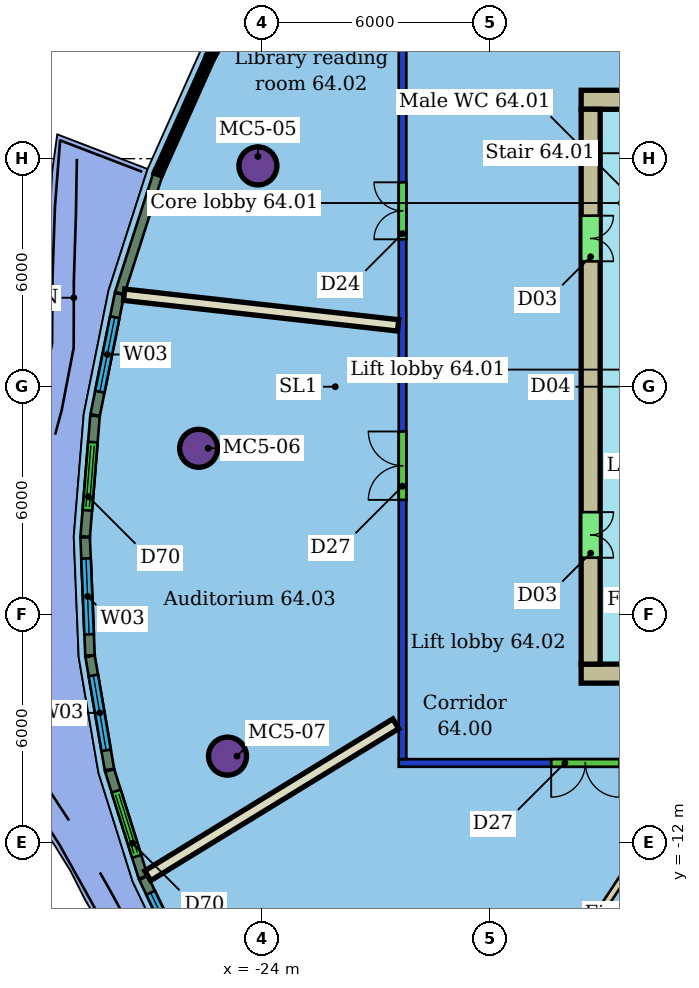
"""IFC4 building model, lengths in metres.
Left out: names, types, materials, properties, quantities, classifications, styles, units other than length and angle.
Written with IfcOpenShell. Run it as: python <this file> out.ifc"""

import sys

from ifc_helpers import new_model, si_unit, direction, frame, frame_2d, origin, origin_2d, place, context, subcontext, project, spatial, rectangle, hollow_circle, extrude, element, fill, save


model = new_model("IFC4")
c1 = context("Model", 3, precision=1e-05, world=origin(), true_north=direction((0.0, 1.0)))
c2 = subcontext(c1, "Body", "Model", "MODEL_VIEW")
j1 = project(units=[si_unit("LENGTHUNIT", "METRE"), si_unit("PLANEANGLEUNIT", "RADIAN")], contexts=[c1])
p1 = place(None, origin())
s1 = spatial("IfcSite", under=j1, at=p1, CompositionType="ELEMENT")
p2 = place(p1, origin())
s2 = spatial("IfcBuilding", under=s1, at=p2, CompositionType="ELEMENT")
p3 = place(p2, frame((0.0, 0.0, 261.3)))
s3 = spatial("IfcBuildingStorey", under=s2, at=p3, CompositionType="ELEMENT", Elevation=261.3)
for number, where, z_axis, x_axis in (
    (1, (-24.106, 5.81, 0.0), (0.0, 0.0, 1.0), (1.0, 0.0, 0.0)),
    (2, (-25.666, -1.62, 0.0), (0.0, 0.0, 1.0), (1.0, 0.0, 0.0)),
    (3, (-24.906, -9.72, 0.0), (0.0, 0.0, 1.0), (1.0, 0.0, 0.0)),
):
    element("IfcColumn", number, at=place(p3, frame(where, z_axis=z_axis, x_axis=x_axis)), inside=s3, PredefinedType="COLUMN", context=c2, shape_type="SweptSolid", body=[
        extrude(hollow_circle(Radius=0.5, WallThickness=0.04, at=origin_2d()), origin(), (0.0, 0.0, 1.0), 3.45),
    ])
p4 = place(p3, frame((8.4, -9.9, 0.0), z_axis=(0.0, 0.0, 1.0), x_axis=(-1.0, 0.0, 0.0)))
e4 = element("IfcWall", 4, at=p4, inside=s3, PredefinedType="PARTITIONING", context=c2, shape_type="SweptSolid", body=[
    extrude(rectangle(XDim=28.8, YDim=0.2, at=frame_2d((14.4, 0.0))), origin(), (0.0, 0.0, 1.0), 3.1),
])
p5 = place(p4, frame((22.989, 0.0, 0.0)))
e5 = element("IfcOpeningElement", 5, at=p5, cuts=e4, PredefinedType="OPENING", context=c2, shape_type="SweptSolid", body=[
    extrude(rectangle(XDim=1.8, YDim=2.4, at=frame_2d((0.9, 1.2))), frame((0.0, 0.11, 0.0), z_axis=(0.0, -1.0, 0.0), x_axis=(1.0, 0.0, 0.0)), (0.0, 0.0, 1.0), 0.22),
])
p6 = place(p4, frame((17.073, 0.0, 0.0)))
e6 = element("IfcOpeningElement", 6, at=p6, cuts=e4, PredefinedType="OPENING", context=c2, shape_type="SweptSolid", body=[
    extrude(rectangle(XDim=1.5, YDim=2.4, at=frame_2d((0.75, 1.2))), frame((0.0, 0.11, 0.0), z_axis=(0.0, -1.0, 0.0), x_axis=(1.0, 0.0, 0.0)), (0.0, 0.0, 1.0), 0.22),
])
p7 = place(p4, frame((8.043, 0.0, 0.0)))
e7 = element("IfcOpeningElement", 7, at=p7, cuts=e4, PredefinedType="OPENING", context=c2, shape_type="SweptSolid", body=[
    extrude(rectangle(XDim=0.9, YDim=2.1, at=frame_2d((0.45, 1.05))), frame((0.0, 0.11, 0.0), z_axis=(0.0, -1.0, 0.0), x_axis=(1.0, 0.0, 0.0)), (0.0, 0.0, 1.0), 0.22),
])
p8 = place(p4, frame((3.308, 0.0, 0.0)))
e8 = element("IfcOpeningElement", 8, at=p8, cuts=e4, PredefinedType="OPENING", context=c2, shape_type="SweptSolid", body=[
    extrude(rectangle(XDim=1.5, YDim=2.1, at=frame_2d((0.75, 1.05))), frame((0.0, 0.11, 0.0), z_axis=(0.0, -1.0, 0.0), x_axis=(1.0, 0.0, 0.0)), (0.0, 0.0, 1.0), 0.22),
])
p9 = place(p3, frame((-20.3, -9.8, 0.0), z_axis=(0.0, 0.0, 1.0), x_axis=(0.0, 1.0, 0.0)))
e9 = element("IfcWall", 9, at=p9, inside=s3, PredefinedType="PARTITIONING", context=c2, shape_type="SweptSolid", body=[
    extrude(rectangle(XDim=19.6, YDim=0.2, at=frame_2d((9.8, 0.0))), origin(), (0.0, 0.0, 1.0), 3.1),
])
p10 = place(p9, frame((13.678, 0.0, 0.0)))
e10 = element("IfcOpeningElement", 10, at=p10, cuts=e9, PredefinedType="OPENING", context=c2, shape_type="SweptSolid", body=[
    extrude(rectangle(XDim=1.5, YDim=2.1, at=frame_2d((0.75, 1.05))), frame((0.0, 0.11, 0.0), z_axis=(0.0, -1.0, 0.0), x_axis=(1.0, 0.0, 0.0)), (0.0, 0.0, 1.0), 0.22),
])
p11 = place(p9, frame((6.822, 0.0, 0.0)))
e11 = element("IfcOpeningElement", 11, at=p11, cuts=e9, PredefinedType="OPENING", context=c2, shape_type="SweptSolid", body=[
    extrude(rectangle(XDim=1.8, YDim=2.4, at=frame_2d((0.9, 1.2))), frame((0.0, 0.11, 0.0), z_axis=(0.0, -1.0, 0.0), x_axis=(1.0, 0.0, 0.0)), (0.0, 0.0, 1.0), 0.22),
])
p12 = place(p3, frame((-27.626, 2.421, 0.0), z_axis=(0.0, 0.0, 1.0), x_axis=(0.993791041834, -0.11126259556, 0.0)))
e12 = element("IfcWall", 12, at=p12, inside=s3, PredefinedType="PARTITIONING", context=c2, shape_type="SweptSolid", body=[
    extrude(rectangle(XDim=7.254, YDim=0.3, at=frame_2d((3.627, 0.0))), origin(), (0.0, 0.0, 1.0), 3.45),
])
p13 = place(p3, frame((-27.006, -12.867, 0.0), z_axis=(0.0, 0.0, 1.0), x_axis=(0.852737367146, 0.522339911047, 0.0)))
e13 = element("IfcWall", 13, at=p13, inside=s3, PredefinedType="PARTITIONING", context=c2, shape_type="SweptSolid", body=[
    extrude(rectangle(XDim=7.655, YDim=0.3, at=frame_2d((3.827, 0.0))), origin(), (0.0, 0.0, 1.0), 3.45),
])
p14 = place(p3, frame((-20.146, -21.485, 0.0), z_axis=(0.0, 0.0, 1.0), x_axis=(0.549897752102, 0.835231981089, 0.0)))
e14 = element("IfcWall", 14, at=p14, inside=s3, PredefinedType="PARTITIONING", context=c2, shape_type="SweptSolid", body=[
    extrude(rectangle(XDim=13.694, YDim=0.175, at=frame_2d((6.847, 0.0))), origin(), (0.0, 0.0, 1.0), 3.45),
])
p15 = place(p3, frame((-26.745, 5.569, 0.0), z_axis=(0.0, 0.0, 1.0), x_axis=(-0.305926817151, -0.95205503126, 0.0)))
e15 = element("IfcWall", 15, at=p15, inside=s3, PredefinedType="SOLIDWALL", context=c2, shape_type="SweptSolid", body=[
    extrude(rectangle(XDim=3.262, YDim=0.25, at=frame_2d((1.631, 0.0))), origin(), (0.0, 0.0, 1.0), 3.15),
])
p16 = place(p3, frame((-27.749, 2.442, 0.0), z_axis=(0.0, 0.0, 1.0), x_axis=(-0.196910086412, -0.980421551104, 0.0)))
e16 = element("IfcWall", 16, at=p16, inside=s3, PredefinedType="SOLIDWALL", context=c2, shape_type="SweptSolid", body=[
    extrude(rectangle(XDim=3.252, YDim=0.25, at=frame_2d((1.626, 0.0))), origin(), (0.0, 0.0, 1.0), 3.15),
])
p17 = place(p16, frame((0.626, 0.0, 0.9)))
e17 = element("IfcOpeningElement", 17, at=p17, cuts=e16, PredefinedType="OPENING", context=c2, shape_type="SweptSolid", body=[
    extrude(rectangle(XDim=2.0, YDim=2.1, at=frame_2d((1.0, 1.05))), frame((0.0, 0.135, 0.0), z_axis=(0.0, -1.0, 0.0), x_axis=(1.0, 0.0, 0.0)), (0.0, 0.0, 1.0), 0.27),
])
p18 = place(p3, frame((-28.393, -0.769, 0.0), z_axis=(0.0, 0.0, 1.0), x_axis=(-0.081211205115, -0.996696914896, 0.0)))
e18 = element("IfcWall", 18, at=p18, inside=s3, PredefinedType="SOLIDWALL", context=c2, shape_type="SweptSolid", body=[
    extrude(rectangle(XDim=3.184, YDim=0.25, at=frame_2d((1.592, 0.0))), origin(), (0.0, 0.0, 1.0), 3.15),
])
p19 = place(p18, frame((0.692, 0.0, 0.0)))
e19 = element("IfcOpeningElement", 19, at=p19, cuts=e18, PredefinedType="OPENING", context=c2, shape_type="SweptSolid", body=[
    extrude(rectangle(XDim=1.8, YDim=2.4, at=frame_2d((0.9, 1.2))), frame((0.0, 0.135, 0.0), z_axis=(0.0, -1.0, 0.0), x_axis=(1.0, 0.0, 0.0)), (0.0, 0.0, 1.0), 0.27),
])
p20 = place(p3, frame((-28.652, -3.965, 0.0), z_axis=(0.0, 0.0, 1.0), x_axis=(0.040878469358, -0.999164126029, 0.0)))
e20 = element("IfcWall", 20, at=p20, inside=s3, PredefinedType="SOLIDWALL", context=c2, shape_type="SweptSolid", body=[
    extrude(rectangle(XDim=3.106, YDim=0.25, at=frame_2d((1.553, 0.0))), origin(), (0.0, 0.0, 1.0), 3.15),
])
p21 = place(p20, frame((0.553, 0.0, 0.9)))
e21 = element("IfcOpeningElement", 21, at=p21, cuts=e20, PredefinedType="OPENING", context=c2, shape_type="SweptSolid", body=[
    extrude(rectangle(XDim=2.0, YDim=2.1, at=frame_2d((1.0, 1.05))), frame((0.0, 0.135, 0.0), z_axis=(0.0, -1.0, 0.0), x_axis=(1.0, 0.0, 0.0)), (0.0, 0.0, 1.0), 0.27),
])
p22 = place(p3, frame((-28.522, -7.092, 0.0), z_axis=(0.0, 0.0, 1.0), x_axis=(0.168497464049, -0.985702087149, 0.0)))
e22 = element("IfcWall", 22, at=p22, inside=s3, PredefinedType="SOLIDWALL", context=c2, shape_type="SweptSolid", body=[
    extrude(rectangle(XDim=3.022, YDim=0.25, at=frame_2d((1.511, 0.0))), origin(), (0.0, 0.0, 1.0), 3.15),
])
p23 = place(p22, frame((0.511, 0.0, 0.9)))
e23 = element("IfcOpeningElement", 23, at=p23, cuts=e22, PredefinedType="OPENING", context=c2, shape_type="SweptSolid", body=[
    extrude(rectangle(XDim=2.0, YDim=2.1, at=frame_2d((1.0, 1.05))), frame((0.0, 0.135, 0.0), z_axis=(0.0, -1.0, 0.0), x_axis=(1.0, 0.0, 0.0)), (0.0, 0.0, 1.0), 0.27),
])
p24 = place(p3, frame((-28.007, -10.096, 0.0), z_axis=(0.0, 0.0, 1.0), x_axis=(0.299763978955, -0.954013394519, 0.0)))
e24 = element("IfcWall", 24, at=p24, inside=s3, PredefinedType="SOLIDWALL", context=c2, shape_type="SweptSolid", body=[
    extrude(rectangle(XDim=2.94, YDim=0.25, at=frame_2d((1.47, 0.0))), origin(), (0.0, 0.0, 1.0), 3.15),
])
p25 = place(p24, frame((0.57, 0.0, 0.0)))
e25 = element("IfcOpeningElement", 25, at=p25, cuts=e24, PredefinedType="OPENING", context=c2, shape_type="SweptSolid", body=[
    extrude(rectangle(XDim=1.8, YDim=2.4, at=frame_2d((0.9, 1.2))), frame((0.0, 0.135, 0.0), z_axis=(0.0, -1.0, 0.0), x_axis=(1.0, 0.0, 0.0)), (0.0, 0.0, 1.0), 0.27),
])
p26 = place(p3, frame((-27.116, -12.925, 0.0), z_axis=(0.0, 0.0, 1.0), x_axis=(0.432043625995, -0.901852707063, 0.0)))
e26 = element("IfcWall", 26, at=p26, inside=s3, PredefinedType="SOLIDWALL", context=c2, shape_type="SweptSolid", body=[
    extrude(rectangle(XDim=2.864, YDim=0.25, at=frame_2d((1.432, 0.0))), origin(), (0.0, 0.0, 1.0), 3.15),
])
p27 = place(p26, frame((0.432, 0.0, 0.9)))
e27 = element("IfcOpeningElement", 27, at=p27, cuts=e26, PredefinedType="OPENING", context=c2, shape_type="SweptSolid", body=[
    extrude(rectangle(XDim=2.0, YDim=2.1, at=frame_2d((1.0, 1.05))), frame((0.0, 0.135, 0.0), z_axis=(0.0, -1.0, 0.0), x_axis=(1.0, 0.0, 0.0)), (0.0, 0.0, 1.0), 0.27),
])
p28 = place(p3, frame((-6.0, 7.55, 0.0), z_axis=(0.0, 0.0, 1.0), x_axis=(-1.0, 0.0, 0.0)))
e28 = element("IfcWall", 28, at=p28, inside=s3, PredefinedType="SHEAR", context=c2, shape_type="SweptSolid", body=[
    extrude(rectangle(XDim=9.6, YDim=0.5, at=frame_2d((4.8, 0.0))), origin(), (0.0, 0.0, 1.0), 3.3),
])
p29 = place(p28, frame((5.2, 0.0, 0.0)))
e29 = element("IfcOpeningElement", 29, at=p29, cuts=e28, PredefinedType="OPENING", context=c2, shape_type="SweptSolid", body=[
    extrude(rectangle(XDim=1.2, YDim=2.1, at=frame_2d((0.6, 1.05))), frame((0.0, 0.26, 0.0), z_axis=(0.0, -1.0, 0.0), x_axis=(1.0, 0.0, 0.0)), (0.0, 0.0, 1.0), 0.52),
])
p30 = place(p3, frame((-15.6, -7.55, 0.0), z_axis=(0.0, 0.0, 1.0), x_axis=(1.0, 0.0, 0.0)))
e30 = element("IfcWall", 30, at=p30, inside=s3, PredefinedType="SHEAR", context=c2, shape_type="SweptSolid", body=[
    extrude(rectangle(XDim=19.2, YDim=0.5, at=frame_2d((9.6, 0.0))), origin(), (0.0, 0.0, 1.0), 3.3),
])
p31 = place(p30, frame((3.6, 0.0, 0.0)))
e31 = element("IfcOpeningElement", 31, at=p31, cuts=e30, PredefinedType="OPENING", context=c2, shape_type="SweptSolid", body=[
    extrude(rectangle(XDim=1.2, YDim=2.1, at=frame_2d((0.6, 1.05))), frame((0.0, 0.26, 0.0), z_axis=(0.0, -1.0, 0.0), x_axis=(1.0, 0.0, 0.0)), (0.0, 0.0, 1.0), 0.52),
])
p32 = place(p3, frame((-15.35, 7.3, 0.0), z_axis=(0.0, 0.0, 1.0), x_axis=(0.0, -1.0, 0.0)))
e32 = element("IfcWall", 32, at=p32, inside=s3, PredefinedType="SHEAR", context=c2, shape_type="SweptSolid", body=[
    extrude(rectangle(XDim=14.6, YDim=0.5, at=frame_2d((7.3, 0.0))), origin(), (0.0, 0.0, 1.0), 3.3),
])
p33 = place(p32, frame((10.6, 0.0, 0.0)))
e33 = element("IfcOpeningElement", 33, at=p33, cuts=e32, PredefinedType="OPENING", context=c2, shape_type="SweptSolid", body=[
    extrude(rectangle(XDim=1.2, YDim=2.1, at=frame_2d((0.6, 1.05))), frame((0.0, 0.26, 0.0), z_axis=(0.0, -1.0, 0.0), x_axis=(1.0, 0.0, 0.0)), (0.0, 0.0, 1.0), 0.52),
])
p34 = place(p32, frame((2.8, 0.0, 0.0)))
e34 = element("IfcOpeningElement", 34, at=p34, cuts=e32, PredefinedType="OPENING", context=c2, shape_type="SweptSolid", body=[
    extrude(rectangle(XDim=1.2, YDim=2.1, at=frame_2d((0.6, 1.05))), frame((0.0, 0.26, 0.0), z_axis=(0.0, -1.0, 0.0), x_axis=(1.0, 0.0, 0.0)), (0.0, 0.0, 1.0), 0.52),
])
p35 = place(p10, origin())
e35 = element("IfcDoor", 35, at=p35, inside=s3, OperationType="DOUBLE_DOOR_SINGLE_SWING", PredefinedType="DOOR", context=c2, shape_type="SweptSolid", body=[
    extrude(rectangle(XDim=1.5, YDim=2.1, at=frame_2d((0.75, 1.05))), frame((0.0, 0.025, 0.0), z_axis=(0.0, -1.0, 0.0), x_axis=(1.0, 0.0, 0.0)), (0.0, 0.0, 1.0), 0.05),
])
fill(e10, e35)
p36 = place(p11, origin())
e36 = element("IfcDoor", 36, at=p36, inside=s3, OperationType="DOUBLE_DOOR_SINGLE_SWING", PredefinedType="DOOR", context=c2, shape_type="SweptSolid", body=[
    extrude(rectangle(XDim=1.8, YDim=2.4, at=frame_2d((0.9, 1.2))), frame((0.0, 0.025, 0.0), z_axis=(0.0, -1.0, 0.0), x_axis=(1.0, 0.0, 0.0)), (0.0, 0.0, 1.0), 0.05),
])
fill(e11, e36)
p37 = place(p5, origin())
e37 = element("IfcDoor", 37, at=p37, inside=s3, OperationType="DOUBLE_DOOR_SINGLE_SWING", PredefinedType="DOOR", context=c2, shape_type="SweptSolid", body=[
    extrude(rectangle(XDim=1.8, YDim=2.4, at=frame_2d((0.9, 1.2))), frame((0.0, 0.025, 0.0), z_axis=(0.0, -1.0, 0.0), x_axis=(1.0, 0.0, 0.0)), (0.0, 0.0, 1.0), 0.05),
])
fill(e5, e37)
p38 = place(p17, origin())
e38 = element("IfcWindow", 38, at=p38, inside=s3, PartitioningType="SINGLE_PANEL", PredefinedType="WINDOW", context=c2, shape_type="SweptSolid", body=[
    extrude(rectangle(XDim=2.0, YDim=2.1, at=frame_2d((1.0, 1.05))), frame((0.0, 0.03, 0.0), z_axis=(0.0, -1.0, 0.0), x_axis=(1.0, 0.0, 0.0)), (0.0, 0.0, 1.0), 0.06),
])
fill(e17, e38)
p39 = place(p19, origin())
e39 = element("IfcDoor", 39, at=p39, inside=s3, OperationType="DOUBLE_DOOR_SLIDING", PredefinedType="DOOR", context=c2, shape_type="SweptSolid", body=[
    extrude(rectangle(XDim=1.8, YDim=2.4, at=frame_2d((0.9, 1.2))), frame((0.0, 0.025, 0.0), z_axis=(0.0, -1.0, 0.0), x_axis=(1.0, 0.0, 0.0)), (0.0, 0.0, 1.0), 0.05),
])
fill(e19, e39)
p40 = place(p21, origin())
e40 = element("IfcWindow", 40, at=p40, inside=s3, PartitioningType="SINGLE_PANEL", PredefinedType="WINDOW", context=c2, shape_type="SweptSolid", body=[
    extrude(rectangle(XDim=2.0, YDim=2.1, at=frame_2d((1.0, 1.05))), frame((0.0, 0.03, 0.0), z_axis=(0.0, -1.0, 0.0), x_axis=(1.0, 0.0, 0.0)), (0.0, 0.0, 1.0), 0.06),
])
fill(e21, e40)
p41 = place(p23, origin())
e41 = element("IfcWindow", 41, at=p41, inside=s3, PartitioningType="SINGLE_PANEL", PredefinedType="WINDOW", context=c2, shape_type="SweptSolid", body=[
    extrude(rectangle(XDim=2.0, YDim=2.1, at=frame_2d((1.0, 1.05))), frame((0.0, 0.03, 0.0), z_axis=(0.0, -1.0, 0.0), x_axis=(1.0, 0.0, 0.0)), (0.0, 0.0, 1.0), 0.06),
])
fill(e23, e41)
p42 = place(p25, origin())
e42 = element("IfcDoor", 42, at=p42, inside=s3, OperationType="DOUBLE_DOOR_SLIDING", PredefinedType="DOOR", context=c2, shape_type="SweptSolid", body=[
    extrude(rectangle(XDim=1.8, YDim=2.4, at=frame_2d((0.9, 1.2))), frame((0.0, 0.025, 0.0), z_axis=(0.0, -1.0, 0.0), x_axis=(1.0, 0.0, 0.0)), (0.0, 0.0, 1.0), 0.05),
])
fill(e25, e42)
p43 = place(p27, origin())
e43 = element("IfcWindow", 43, at=p43, inside=s3, PartitioningType="SINGLE_PANEL", PredefinedType="WINDOW", context=c2, shape_type="SweptSolid", body=[
    extrude(rectangle(XDim=2.0, YDim=2.1, at=frame_2d((1.0, 1.05))), frame((0.0, 0.03, 0.0), z_axis=(0.0, -1.0, 0.0), x_axis=(1.0, 0.0, 0.0)), (0.0, 0.0, 1.0), 0.06),
])
fill(e27, e43)
p44 = place(p33, origin())
e44 = element("IfcDoor", 44, at=p44, inside=s3, OperationType="DOUBLE_DOOR_SINGLE_SWING", PredefinedType="NOTDEFINED", context=c2, shape_type="SweptSolid", body=[
    extrude(rectangle(XDim=1.2, YDim=2.1, at=frame_2d((0.6, 1.05))), frame((0.0, 0.025, 0.0), z_axis=(0.0, -1.0, 0.0), x_axis=(1.0, 0.0, 0.0)), (0.0, 0.0, 1.0), 0.05),
])
fill(e33, e44)
p45 = place(p34, origin())
e45 = element("IfcDoor", 45, at=p45, inside=s3, OperationType="DOUBLE_DOOR_SINGLE_SWING", PredefinedType="NOTDEFINED", context=c2, shape_type="SweptSolid", body=[
    extrude(rectangle(XDim=1.2, YDim=2.1, at=frame_2d((0.6, 1.05))), frame((0.0, 0.025, 0.0), z_axis=(0.0, -1.0, 0.0), x_axis=(1.0, 0.0, 0.0)), (0.0, 0.0, 1.0), 0.05),
])
fill(e34, e45)
save(model, sys.argv[1])
